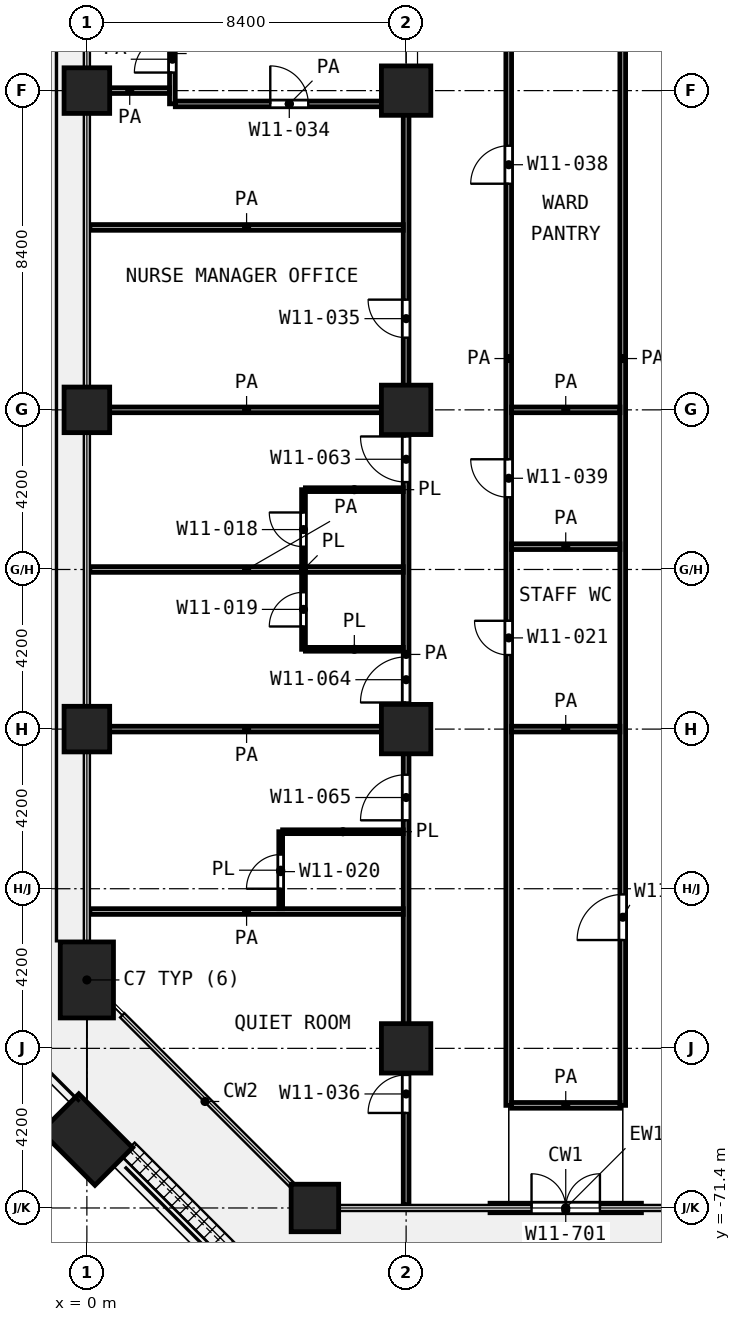
"""IFC4 building model, lengths in metres.
Left out: names, types, materials, properties, quantities, classifications, styles, units other than length and angle.
Written with IfcOpenShell. Run it as: python <this file> out.ifc"""

import sys

from ifc_helpers import new_model, si_unit, direction, frame, frame_2d, origin, origin_2d, place, context, subcontext, project, spatial, rectangle, extrude, element, fill, save


model = new_model("IFC4")
c1 = context("Model", 3, precision=1e-05, world=origin(), true_north=direction((0.0, 1.0)))
c2 = subcontext(c1, "Body", "Model", "MODEL_VIEW")
j1 = project(units=[si_unit("LENGTHUNIT", "METRE"), si_unit("PLANEANGLEUNIT", "RADIAN")], contexts=[c1])
p1 = place(None, origin())
s1 = spatial("IfcSite", under=j1, at=p1, CompositionType="ELEMENT")
p2 = place(p1, origin())
s2 = spatial("IfcBuilding", under=s1, at=p2, CompositionType="ELEMENT")
p3 = place(p2, frame((0.0, 0.0, 51.8)))
s3 = spatial("IfcBuildingStorey", under=s2, at=p3, CompositionType="ELEMENT", Elevation=51.8)
p4 = place(p3, frame((0.0, -42.0, 0.0), z_axis=(0.0, 0.0, 1.0), x_axis=(1.0, 0.0, 0.0)))
e1 = element("IfcColumn", 1, at=p4, inside=s3, PredefinedType="COLUMN", context=c2, shape_type="SweptSolid", body=[
    extrude(rectangle(XDim=1.2, YDim=1.2, at=origin_2d()), origin(), (0.0, 0.0, 1.0), 4.2),
])
p5 = place(p3, frame((8.4, -42.0, 0.0), z_axis=(0.0, 0.0, 1.0), x_axis=(1.0, 0.0, 0.0)))
e2 = element("IfcColumn", 2, at=p5, inside=s3, PredefinedType="COLUMN", context=c2, shape_type="SweptSolid", body=[
    extrude(rectangle(XDim=1.3, YDim=1.3, at=origin_2d()), origin(), (0.0, 0.0, 1.0), 4.2),
])
p6 = place(p3, frame((0.0, -50.4, 0.0), z_axis=(0.0, 0.0, 1.0), x_axis=(1.0, 0.0, 0.0)))
e3 = element("IfcColumn", 3, at=p6, inside=s3, PredefinedType="COLUMN", context=c2, shape_type="SweptSolid", body=[
    extrude(rectangle(XDim=1.2, YDim=1.2, at=origin_2d()), origin(), (0.0, 0.0, 1.0), 4.2),
])
p7 = place(p3, frame((8.4, -50.4, 0.0), z_axis=(0.0, 0.0, 1.0), x_axis=(1.0, 0.0, 0.0)))
e4 = element("IfcColumn", 4, at=p7, inside=s3, PredefinedType="COLUMN", context=c2, shape_type="SweptSolid", body=[
    extrude(rectangle(XDim=1.3, YDim=1.3, at=origin_2d()), origin(), (0.0, 0.0, 1.0), 4.2),
])
p8 = place(p3, frame((0.0, -58.8, 0.0), z_axis=(0.0, 0.0, 1.0), x_axis=(1.0, 0.0, 0.0)))
e5 = element("IfcColumn", 5, at=p8, inside=s3, PredefinedType="COLUMN", context=c2, shape_type="SweptSolid", body=[
    extrude(rectangle(XDim=1.2, YDim=1.2, at=origin_2d()), origin(), (0.0, 0.0, 1.0), 4.2),
])
p9 = place(p3, frame((8.4, -58.8, 0.0), z_axis=(0.0, 0.0, 1.0), x_axis=(1.0, 0.0, 0.0)))
e6 = element("IfcColumn", 6, at=p9, inside=s3, PredefinedType="COLUMN", context=c2, shape_type="SweptSolid", body=[
    extrude(rectangle(XDim=1.3, YDim=1.3, at=origin_2d()), origin(), (0.0, 0.0, 1.0), 4.2),
])
p10 = place(p3, frame((0.0, -65.4, 0.0), z_axis=(0.0, 0.0, 1.0), x_axis=(0.0, 1.0, 0.0)))
e7 = element("IfcColumn", 7, at=p10, inside=s3, PredefinedType="COLUMN", context=c2, shape_type="SweptSolid", body=[
    extrude(rectangle(XDim=2.0, YDim=1.4, at=origin_2d()), origin(), (0.0, 0.0, 1.0), 4.2),
])
p11 = place(p3, frame((8.4, -67.2, 0.0), z_axis=(0.0, 0.0, 1.0), x_axis=(1.0, 0.0, 0.0)))
e8 = element("IfcColumn", 8, at=p11, inside=s3, PredefinedType="COLUMN", context=c2, shape_type="SweptSolid", body=[
    extrude(rectangle(XDim=1.3, YDim=1.3, at=origin_2d()), origin(), (0.0, 0.0, 1.0), 4.2),
])
p12 = place(p3, frame((6.0, -71.4, 0.0), z_axis=(0.0, 0.0, 1.0), x_axis=(1.0, 0.0, 0.0)))
e9 = element("IfcColumn", 9, at=p12, inside=s3, PredefinedType="COLUMN", context=c2, shape_type="SweptSolid", body=[
    extrude(rectangle(XDim=1.25, YDim=1.25, at=origin_2d()), origin(), (0.0, 0.0, 1.0), 4.2),
])
p13 = place(p3, frame((0.0, -69.6, 0.0), z_axis=(0.0, 0.0, 1.0), x_axis=(-0.707106781187, 0.707106781187, 0.0)))
e10 = element("IfcColumn", 10, at=p13, inside=s3, PredefinedType="COLUMN", context=c2, shape_type="SweptSolid", body=[
    extrude(rectangle(XDim=2.0, YDim=1.4, at=origin_2d()), origin(), (0.0, 0.0, 1.0), 4.2),
])
p14 = place(p3, frame((10.608, -71.4, 0.0), z_axis=(0.0, 0.0, 1.0), x_axis=(1.0, 0.0, 0.0)))
e11 = element("IfcWall", 11, at=p14, inside=s3, PredefinedType="SOLIDWALL", context=c2, shape_type="SweptSolid", body=[
    extrude(rectangle(XDim=3.983, YDim=0.25, at=frame_2d((1.992, 0.0))), origin(), (0.0, 0.0, 1.0), 3.78),
])
p15 = place(p14, frame((1.092, 0.0, 0.0)))
e12 = element("IfcOpeningElement", 12, at=p15, cuts=e11, PredefinedType="OPENING", context=c2, shape_type="SweptSolid", body=[
    extrude(rectangle(XDim=1.8, YDim=2.1, at=frame_2d((0.9, 1.05))), frame((0.0, 0.135, 0.0), z_axis=(0.0, -1.0, 0.0), x_axis=(1.0, 0.0, 0.0)), (0.0, 0.0, 1.0), 0.27),
])
p16 = place(p3, frame((5.15, -61.5, 0.0), z_axis=(0.0, 0.0, 1.0), x_axis=(1.0, 0.0, 0.0)))
e13 = element("IfcWall", 13, at=p16, inside=s3, PredefinedType="PARTITIONING", context=c2, shape_type="SweptSolid", body=[
    extrude(rectangle(XDim=3.175, YDim=0.1, at=frame_2d((1.587, 0.0))), origin(), (0.0, 0.0, 1.0), 3.9),
])
for number, where, z_axis, x_axis in (
    (14, (5.75, -56.7, 0.0), (0.0, 0.0, 1.0), (1.0, 0.0, 0.0)),
    (15, (5.75, -52.5, 0.0), (0.0, 0.0, 1.0), (1.0, 0.0, 0.0)),
):
    element("IfcWall", number, at=place(p3, frame(where, z_axis=z_axis, x_axis=x_axis)), inside=s3, PredefinedType="PARTITIONING", context=c2, shape_type="SweptSolid", body=[
        extrude(rectangle(XDim=2.575, YDim=0.1, at=frame_2d((1.288, 0.0))), origin(), (0.0, 0.0, 1.0), 3.9),
    ])
p17 = place(p3, frame((5.1, -63.525, 0.0), z_axis=(0.0, 0.0, 1.0), x_axis=(0.0, 1.0, 0.0)))
e16 = element("IfcWall", 16, at=p17, inside=s3, PredefinedType="PARTITIONING", context=c2, shape_type="SweptSolid", body=[
    extrude(rectangle(XDim=2.025, YDim=0.1, at=frame_2d((1.012, 0.0))), origin(), (0.0, 0.0, 1.0), 3.9),
])
p18 = place(p17, frame((0.525, 0.0, 0.0)))
e17 = element("IfcOpeningElement", 17, at=p18, cuts=e16, PredefinedType="OPENING", context=c2, shape_type="SweptSolid", body=[
    extrude(rectangle(XDim=0.9, YDim=2.1, at=frame_2d((0.45, 1.05))), frame((0.0, 0.06, 0.0), z_axis=(0.0, -1.0, 0.0), x_axis=(1.0, 0.0, 0.0)), (0.0, 0.0, 1.0), 0.12),
])
p19 = place(p3, frame((5.7, -56.7, 0.0), z_axis=(0.0, 0.0, 1.0), x_axis=(0.0, 1.0, 0.0)))
e18 = element("IfcWall", 18, at=p19, inside=s3, PredefinedType="PARTITIONING", context=c2, shape_type="SweptSolid", body=[
    extrude(rectangle(XDim=4.2, YDim=0.1, at=frame_2d((2.1, 0.0))), origin(), (0.0, 0.0, 1.0), 3.9),
])
p20 = place(p19, frame((2.7, 0.0, 0.0)))
e19 = element("IfcOpeningElement", 19, at=p20, cuts=e18, PredefinedType="OPENING", context=c2, shape_type="SweptSolid", body=[
    extrude(rectangle(XDim=0.9, YDim=2.1, at=frame_2d((0.45, 1.05))), frame((0.0, 0.06, 0.0), z_axis=(0.0, -1.0, 0.0), x_axis=(1.0, 0.0, 0.0)), (0.0, 0.0, 1.0), 0.12),
])
p21 = place(p19, frame((0.6, 0.0, 0.0)))
e20 = element("IfcOpeningElement", 20, at=p21, cuts=e18, PredefinedType="OPENING", context=c2, shape_type="SweptSolid", body=[
    extrude(rectangle(XDim=0.9, YDim=2.1, at=frame_2d((0.45, 1.05))), frame((0.0, 0.06, 0.0), z_axis=(0.0, -1.0, 0.0), x_axis=(1.0, 0.0, 0.0)), (0.0, 0.0, 1.0), 0.12),
])
p22 = place(p3, frame((11.175, -68.7, 0.0), z_axis=(0.0, 0.0, 1.0), x_axis=(1.0, 0.0, 0.0)))
e21 = element("IfcWall", 21, at=p22, inside=s3, PredefinedType="PARTITIONING", context=c2, shape_type="SweptSolid", body=[
    extrude(rectangle(XDim=2.85, YDim=0.15, at=frame_2d((1.425, 0.0))), origin(), (0.0, 0.0, 1.0), 3.9),
])
for number, where, z_axis, x_axis in (
    (22, (0.08, -63.6, 0.0), (0.0, 0.0, 1.0), (1.0, 0.0, 0.0)),
    (23, (0.08, -58.8, 0.0), (0.0, 0.0, 1.0), (1.0, 0.0, 0.0)),
):
    element("IfcWall", number, at=place(p3, frame(where, z_axis=z_axis, x_axis=x_axis)), inside=s3, PredefinedType="PARTITIONING", context=c2, shape_type="SweptSolid", body=[
        extrude(rectangle(XDim=8.245, YDim=0.15, at=frame_2d((4.123, 0.0))), origin(), (0.0, 0.0, 1.0), 3.9),
    ])
p23 = place(p3, frame((11.175, -58.8, 0.0), z_axis=(0.0, 0.0, 1.0), x_axis=(1.0, 0.0, 0.0)))
e24 = element("IfcWall", 24, at=p23, inside=s3, PredefinedType="PARTITIONING", context=c2, shape_type="SweptSolid", body=[
    extrude(rectangle(XDim=2.85, YDim=0.15, at=frame_2d((1.425, 0.0))), origin(), (0.0, 0.0, 1.0), 3.9),
])
p24 = place(p3, frame((0.08, -54.6, 0.0), z_axis=(0.0, 0.0, 1.0), x_axis=(1.0, 0.0, 0.0)))
e25 = element("IfcWall", 25, at=p24, inside=s3, PredefinedType="PARTITIONING", context=c2, shape_type="SweptSolid", body=[
    extrude(rectangle(XDim=8.245, YDim=0.15, at=frame_2d((4.123, 0.0))), origin(), (0.0, 0.0, 1.0), 3.9),
])
p25 = place(p3, frame((11.175, -54.0, 0.0), z_axis=(0.0, 0.0, 1.0), x_axis=(1.0, 0.0, 0.0)))
e26 = element("IfcWall", 26, at=p25, inside=s3, PredefinedType="PARTITIONING", context=c2, shape_type="SweptSolid", body=[
    extrude(rectangle(XDim=2.85, YDim=0.15, at=frame_2d((1.425, 0.0))), origin(), (0.0, 0.0, 1.0), 3.9),
])
p26 = place(p3, frame((0.08, -50.4, 0.0), z_axis=(0.0, 0.0, 1.0), x_axis=(1.0, 0.0, 0.0)))
e27 = element("IfcWall", 27, at=p26, inside=s3, PredefinedType="PARTITIONING", context=c2, shape_type="SweptSolid", body=[
    extrude(rectangle(XDim=8.245, YDim=0.15, at=frame_2d((4.123, 0.0))), origin(), (0.0, 0.0, 1.0), 3.9),
])
p27 = place(p3, frame((11.175, -50.4, 0.0), z_axis=(0.0, 0.0, 1.0), x_axis=(1.0, 0.0, 0.0)))
e28 = element("IfcWall", 28, at=p27, inside=s3, PredefinedType="PARTITIONING", context=c2, shape_type="SweptSolid", body=[
    extrude(rectangle(XDim=2.85, YDim=0.15, at=frame_2d((1.425, 0.0))), origin(), (0.0, 0.0, 1.0), 3.9),
])
p28 = place(p3, frame((0.08, -45.6, 0.0), z_axis=(0.0, 0.0, 1.0), x_axis=(1.0, 0.0, 0.0)))
e29 = element("IfcWall", 29, at=p28, inside=s3, PredefinedType="PARTITIONING", context=c2, shape_type="SweptSolid", body=[
    extrude(rectangle(XDim=8.245, YDim=0.15, at=frame_2d((4.123, 0.0))), origin(), (0.0, 0.0, 1.0), 3.9),
])
p29 = place(p3, frame((2.327, -42.35, 0.0), z_axis=(0.0, 0.0, 1.0), x_axis=(1.0, 0.0, 0.0)))
e30 = element("IfcWall", 30, at=p29, inside=s3, PredefinedType="PARTITIONING", context=c2, shape_type="SweptSolid", body=[
    extrude(rectangle(XDim=5.998, YDim=0.15, at=frame_2d((2.999, 0.0))), origin(), (0.0, 0.0, 1.0), 3.9),
])
p30 = place(p29, frame((2.499, 0.0, 0.0)))
e31 = element("IfcOpeningElement", 31, at=p30, cuts=e30, PredefinedType="OPENING", context=c2, shape_type="SweptSolid", body=[
    extrude(rectangle(XDim=1.0, YDim=2.1, at=frame_2d((0.5, 1.05))), frame((0.0, 0.085, 0.0), z_axis=(0.0, -1.0, 0.0), x_axis=(1.0, 0.0, 0.0)), (0.0, 0.0, 1.0), 0.17),
])
p31 = place(p3, frame((0.08, -42.0, 0.0), z_axis=(0.0, 0.0, 1.0), x_axis=(1.0, 0.0, 0.0)))
e32 = element("IfcWall", 32, at=p31, inside=s3, PredefinedType="PARTITIONING", context=c2, shape_type="SweptSolid", body=[
    extrude(rectangle(XDim=2.095, YDim=0.15, at=frame_2d((1.047, 0.0))), origin(), (0.0, 0.0, 1.0), 3.9),
])
p32 = place(p3, frame((2.25, -42.348, 0.0), z_axis=(0.0, 0.0, 1.0), x_axis=(0.0, 1.0, 0.0)))
e33 = element("IfcWall", 33, at=p32, inside=s3, PredefinedType="PARTITIONING", context=c2, shape_type="SweptSolid", body=[
    extrude(rectangle(XDim=2.348, YDim=0.15, at=frame_2d((1.174, 0.0))), origin(), (0.0, 0.0, 1.0), 3.9),
])
p33 = place(p32, frame((0.823, 0.0, 0.0)))
e34 = element("IfcOpeningElement", 34, at=p33, cuts=e33, PredefinedType="OPENING", context=c2, shape_type="SweptSolid", body=[
    extrude(rectangle(XDim=1.0, YDim=2.1, at=frame_2d((0.5, 1.05))), frame((0.0, 0.085, 0.0), z_axis=(0.0, -1.0, 0.0), x_axis=(1.0, 0.0, 0.0)), (0.0, 0.0, 1.0), 0.17),
])
p34 = place(p3, frame((8.4, -71.32, 0.0), z_axis=(0.0, 0.0, 1.0), x_axis=(0.0, 1.0, 0.0)))
e35 = element("IfcWall", 35, at=p34, inside=s3, PredefinedType="PARTITIONING", context=c2, shape_type="SweptSolid", body=[
    extrude(rectangle(XDim=28.97, YDim=0.15, at=frame_2d((14.485, 0.0))), origin(), (0.0, 0.0, 1.0), 3.9),
])
p35 = place(p34, frame((22.82, 0.0, 0.0)))
e36 = element("IfcOpeningElement", 36, at=p35, cuts=e35, PredefinedType="OPENING", context=c2, shape_type="SweptSolid", body=[
    extrude(rectangle(XDim=1.0, YDim=2.1, at=frame_2d((0.5, 1.05))), frame((0.0, 0.085, 0.0), z_axis=(0.0, -1.0, 0.0), x_axis=(1.0, 0.0, 0.0)), (0.0, 0.0, 1.0), 0.17),
])
p36 = place(p34, frame((19.02, 0.0, 0.0)))
e37 = element("IfcOpeningElement", 37, at=p36, cuts=e35, PredefinedType="OPENING", context=c2, shape_type="SweptSolid", body=[
    extrude(rectangle(XDim=1.2, YDim=2.1, at=frame_2d((0.6, 1.05))), frame((0.0, 0.085, 0.0), z_axis=(0.0, -1.0, 0.0), x_axis=(1.0, 0.0, 0.0)), (0.0, 0.0, 1.0), 0.17),
])
p37 = place(p34, frame((13.22, 0.0, 0.0)))
e38 = element("IfcOpeningElement", 38, at=p37, cuts=e35, PredefinedType="OPENING", context=c2, shape_type="SweptSolid", body=[
    extrude(rectangle(XDim=1.2, YDim=2.1, at=frame_2d((0.6, 1.05))), frame((0.0, 0.085, 0.0), z_axis=(0.0, -1.0, 0.0), x_axis=(1.0, 0.0, 0.0)), (0.0, 0.0, 1.0), 0.17),
])
p38 = place(p34, frame((10.12, 0.0, 0.0)))
e39 = element("IfcOpeningElement", 39, at=p38, cuts=e35, PredefinedType="OPENING", context=c2, shape_type="SweptSolid", body=[
    extrude(rectangle(XDim=1.2, YDim=2.1, at=frame_2d((0.6, 1.05))), frame((0.0, 0.085, 0.0), z_axis=(0.0, -1.0, 0.0), x_axis=(1.0, 0.0, 0.0)), (0.0, 0.0, 1.0), 0.17),
])
p39 = place(p34, frame((2.42, 0.0, 0.0)))
e40 = element("IfcOpeningElement", 40, at=p39, cuts=e35, PredefinedType="OPENING", context=c2, shape_type="SweptSolid", body=[
    extrude(rectangle(XDim=1.0, YDim=2.1, at=frame_2d((0.5, 1.05))), frame((0.0, 0.085, 0.0), z_axis=(0.0, -1.0, 0.0), x_axis=(1.0, 0.0, 0.0)), (0.0, 0.0, 1.0), 0.17),
])
p40 = place(p3, frame((11.1, -68.7, 0.0), z_axis=(0.0, 0.0, 1.0), x_axis=(0.0, 1.0, 0.0)))
e41 = element("IfcWall", 41, at=p40, inside=s3, PredefinedType="PARTITIONING", context=c2, shape_type="SweptSolid", body=[
    extrude(rectangle(XDim=39.3, YDim=0.15, at=frame_2d((19.65, 0.0))), origin(), (0.0, 0.0, 1.0), 3.9),
])
p41 = place(p40, frame((34.75, 0.0, 0.0)))
e42 = element("IfcOpeningElement", 42, at=p41, cuts=e41, PredefinedType="OPENING", context=c2, shape_type="SweptSolid", body=[
    extrude(rectangle(XDim=1.0, YDim=2.1, at=frame_2d((0.5, 1.05))), frame((0.0, 0.085, 0.0), z_axis=(0.0, -1.0, 0.0), x_axis=(1.0, 0.0, 0.0)), (0.0, 0.0, 1.0), 0.17),
])
p42 = place(p40, frame((24.25, 0.0, 0.0)))
e43 = element("IfcOpeningElement", 43, at=p42, cuts=e41, PredefinedType="OPENING", context=c2, shape_type="SweptSolid", body=[
    extrude(rectangle(XDim=1.0, YDim=2.1, at=frame_2d((0.5, 1.05))), frame((0.0, 0.085, 0.0), z_axis=(0.0, -1.0, 0.0), x_axis=(1.0, 0.0, 0.0)), (0.0, 0.0, 1.0), 0.17),
])
p43 = place(p40, frame((16.0, 0.0, 0.0)))
e44 = element("IfcOpeningElement", 44, at=p43, cuts=e41, PredefinedType="OPENING", context=c2, shape_type="SweptSolid", body=[
    extrude(rectangle(XDim=1.0, YDim=2.1, at=frame_2d((0.5, 1.05))), frame((0.0, 0.085, 0.0), z_axis=(0.0, -1.0, 0.0), x_axis=(1.0, 0.0, 0.0)), (0.0, 0.0, 1.0), 0.17),
])
p44 = place(p40, frame((11.85, 0.0, 0.0)))
e45 = element("IfcOpeningElement", 45, at=p44, cuts=e41, PredefinedType="OPENING", context=c2, shape_type="SweptSolid", body=[
    extrude(rectangle(XDim=0.9, YDim=2.1, at=frame_2d((0.45, 1.05))), frame((0.0, 0.085, 0.0), z_axis=(0.0, -1.0, 0.0), x_axis=(1.0, 0.0, 0.0)), (0.0, 0.0, 1.0), 0.17),
])
p45 = place(p3, frame((14.1, -68.7, 0.0), z_axis=(0.0, 0.0, 1.0), x_axis=(0.0, 1.0, 0.0)))
e46 = element("IfcWall", 46, at=p45, inside=s3, PredefinedType="PARTITIONING", context=c2, shape_type="SweptSolid", body=[
    extrude(rectangle(XDim=39.3, YDim=0.15, at=frame_2d((19.65, 0.0))), origin(), (0.0, 0.0, 1.0), 3.9),
])
p46 = place(p45, frame((4.35, 0.0, 0.0)))
e47 = element("IfcOpeningElement", 47, at=p46, cuts=e46, PredefinedType="OPENING", context=c2, shape_type="SweptSolid", body=[
    extrude(rectangle(XDim=1.2, YDim=2.1, at=frame_2d((0.6, 1.05))), frame((0.0, 0.085, 0.0), z_axis=(0.0, -1.0, 0.0), x_axis=(1.0, 0.0, 0.0)), (0.0, 0.0, 1.0), 0.17),
])
p47 = place(p15, origin())
e48 = element("IfcDoor", 48, at=p47, inside=s3, OperationType="DOUBLE_DOOR_SINGLE_SWING", PredefinedType="DOOR", context=c2, shape_type="SweptSolid", body=[
    extrude(rectangle(XDim=1.8, YDim=2.1, at=frame_2d((0.9, 1.05))), frame((0.0, 0.025, 0.0), z_axis=(0.0, -1.0, 0.0), x_axis=(1.0, 0.0, 0.0)), (0.0, 0.0, 1.0), 0.05),
])
fill(e12, e48)
p48 = place(p33, origin())
e49 = element("IfcDoor", 49, at=p48, inside=s3, OperationType="SINGLE_SWING_LEFT", PredefinedType="DOOR", context=c2, shape_type="SweptSolid", body=[
    extrude(rectangle(XDim=1.0, YDim=2.1, at=frame_2d((0.5, 1.05))), frame((0.0, 0.025, 0.0), z_axis=(0.0, -1.0, 0.0), x_axis=(1.0, 0.0, 0.0)), (0.0, 0.0, 1.0), 0.05),
])
fill(e34, e49)
p49 = place(p30, origin())
e50 = element("IfcDoor", 50, at=p49, inside=s3, OperationType="SINGLE_SWING_LEFT", PredefinedType="DOOR", context=c2, shape_type="SweptSolid", body=[
    extrude(rectangle(XDim=1.0, YDim=2.1, at=frame_2d((0.5, 1.05))), frame((0.0, 0.025, 0.0), z_axis=(0.0, -1.0, 0.0), x_axis=(1.0, 0.0, 0.0)), (0.0, 0.0, 1.0), 0.05),
])
fill(e31, e50)
p50 = place(p35, origin())
e51 = element("IfcDoor", 51, at=p50, inside=s3, OperationType="SINGLE_SWING_RIGHT", PredefinedType="DOOR", context=c2, shape_type="SweptSolid", body=[
    extrude(rectangle(XDim=1.0, YDim=2.1, at=frame_2d((0.5, 1.05))), frame((0.0, 0.025, 0.0), z_axis=(0.0, -1.0, 0.0), x_axis=(1.0, 0.0, 0.0)), (0.0, 0.0, 1.0), 0.05),
])
fill(e36, e51)
p51 = place(p36, origin())
e52 = element("IfcDoor", 52, at=p51, inside=s3, OperationType="SINGLE_SWING_RIGHT", PredefinedType="DOOR", context=c2, shape_type="SweptSolid", body=[
    extrude(rectangle(XDim=1.2, YDim=2.1, at=frame_2d((0.6, 1.05))), frame((0.0, 0.025, 0.0), z_axis=(0.0, -1.0, 0.0), x_axis=(1.0, 0.0, 0.0)), (0.0, 0.0, 1.0), 0.05),
])
fill(e37, e52)
p52 = place(p20, origin())
e53 = element("IfcDoor", 53, at=p52, inside=s3, OperationType="SINGLE_SWING_RIGHT", PredefinedType="DOOR", context=c2, shape_type="SweptSolid", body=[
    extrude(rectangle(XDim=0.9, YDim=2.1, at=frame_2d((0.45, 1.05))), frame((0.0, 0.025, 0.0), z_axis=(0.0, -1.0, 0.0), x_axis=(1.0, 0.0, 0.0)), (0.0, 0.0, 1.0), 0.05),
])
fill(e19, e53)
p53 = place(p37, origin())
e54 = element("IfcDoor", 54, at=p53, inside=s3, OperationType="SINGLE_SWING_LEFT", PredefinedType="DOOR", context=c2, shape_type="SweptSolid", body=[
    extrude(rectangle(XDim=1.2, YDim=2.1, at=frame_2d((0.6, 1.05))), frame((0.0, 0.025, 0.0), z_axis=(0.0, -1.0, 0.0), x_axis=(1.0, 0.0, 0.0)), (0.0, 0.0, 1.0), 0.05),
])
fill(e38, e54)
p54 = place(p21, origin())
e55 = element("IfcDoor", 55, at=p54, inside=s3, OperationType="SINGLE_SWING_LEFT", PredefinedType="DOOR", context=c2, shape_type="SweptSolid", body=[
    extrude(rectangle(XDim=0.9, YDim=2.1, at=frame_2d((0.45, 1.05))), frame((0.0, 0.025, 0.0), z_axis=(0.0, -1.0, 0.0), x_axis=(1.0, 0.0, 0.0)), (0.0, 0.0, 1.0), 0.05),
])
fill(e20, e55)
p55 = place(p38, origin())
e56 = element("IfcDoor", 56, at=p55, inside=s3, OperationType="SINGLE_SWING_LEFT", PredefinedType="DOOR", context=c2, shape_type="SweptSolid", body=[
    extrude(rectangle(XDim=1.2, YDim=2.1, at=frame_2d((0.6, 1.05))), frame((0.0, 0.025, 0.0), z_axis=(0.0, -1.0, 0.0), x_axis=(1.0, 0.0, 0.0)), (0.0, 0.0, 1.0), 0.05),
])
fill(e39, e56)
p56 = place(p18, origin())
e57 = element("IfcDoor", 57, at=p56, inside=s3, OperationType="SINGLE_SWING_LEFT", PredefinedType="DOOR", context=c2, shape_type="SweptSolid", body=[
    extrude(rectangle(XDim=0.9, YDim=2.1, at=frame_2d((0.45, 1.05))), frame((0.0, 0.025, 0.0), z_axis=(0.0, -1.0, 0.0), x_axis=(1.0, 0.0, 0.0)), (0.0, 0.0, 1.0), 0.05),
])
fill(e17, e57)
p57 = place(p39, origin())
e58 = element("IfcDoor", 58, at=p57, inside=s3, OperationType="SINGLE_SWING_LEFT", PredefinedType="DOOR", context=c2, shape_type="SweptSolid", body=[
    extrude(rectangle(XDim=1.0, YDim=2.1, at=frame_2d((0.5, 1.05))), frame((0.0, 0.025, 0.0), z_axis=(0.0, -1.0, 0.0), x_axis=(1.0, 0.0, 0.0)), (0.0, 0.0, 1.0), 0.05),
])
fill(e40, e58)
p58 = place(p42, origin())
e59 = element("IfcDoor", 59, at=p58, inside=s3, OperationType="SINGLE_SWING_LEFT", PredefinedType="DOOR", context=c2, shape_type="SweptSolid", body=[
    extrude(rectangle(XDim=1.0, YDim=2.1, at=frame_2d((0.5, 1.05))), frame((0.0, 0.025, 0.0), z_axis=(0.0, -1.0, 0.0), x_axis=(1.0, 0.0, 0.0)), (0.0, 0.0, 1.0), 0.05),
])
fill(e43, e59)
p59 = place(p43, origin())
e60 = element("IfcDoor", 60, at=p59, inside=s3, OperationType="SINGLE_SWING_RIGHT", PredefinedType="DOOR", context=c2, shape_type="SweptSolid", body=[
    extrude(rectangle(XDim=1.0, YDim=2.1, at=frame_2d((0.5, 1.05))), frame((0.0, 0.025, 0.0), z_axis=(0.0, -1.0, 0.0), x_axis=(1.0, 0.0, 0.0)), (0.0, 0.0, 1.0), 0.05),
])
fill(e44, e60)
p60 = place(p44, origin())
e61 = element("IfcDoor", 61, at=p60, inside=s3, OperationType="SINGLE_SWING_RIGHT", PredefinedType="DOOR", context=c2, shape_type="SweptSolid", body=[
    extrude(rectangle(XDim=0.9, YDim=2.1, at=frame_2d((0.45, 1.05))), frame((0.0, 0.025, 0.0), z_axis=(0.0, -1.0, 0.0), x_axis=(1.0, 0.0, 0.0)), (0.0, 0.0, 1.0), 0.05),
])
fill(e45, e61)
p61 = place(p46, origin())
e62 = element("IfcDoor", 62, at=p61, inside=s3, OperationType="SINGLE_SWING_LEFT", PredefinedType="DOOR", context=c2, shape_type="SweptSolid", body=[
    extrude(rectangle(XDim=1.2, YDim=2.1, at=frame_2d((0.6, 1.05))), frame((0.0, 0.025, 0.0), z_axis=(0.0, -1.0, 0.0), x_axis=(1.0, 0.0, 0.0)), (0.0, 0.0, 1.0), 0.05),
])
fill(e47, e62)
save(model, sys.argv[1])
